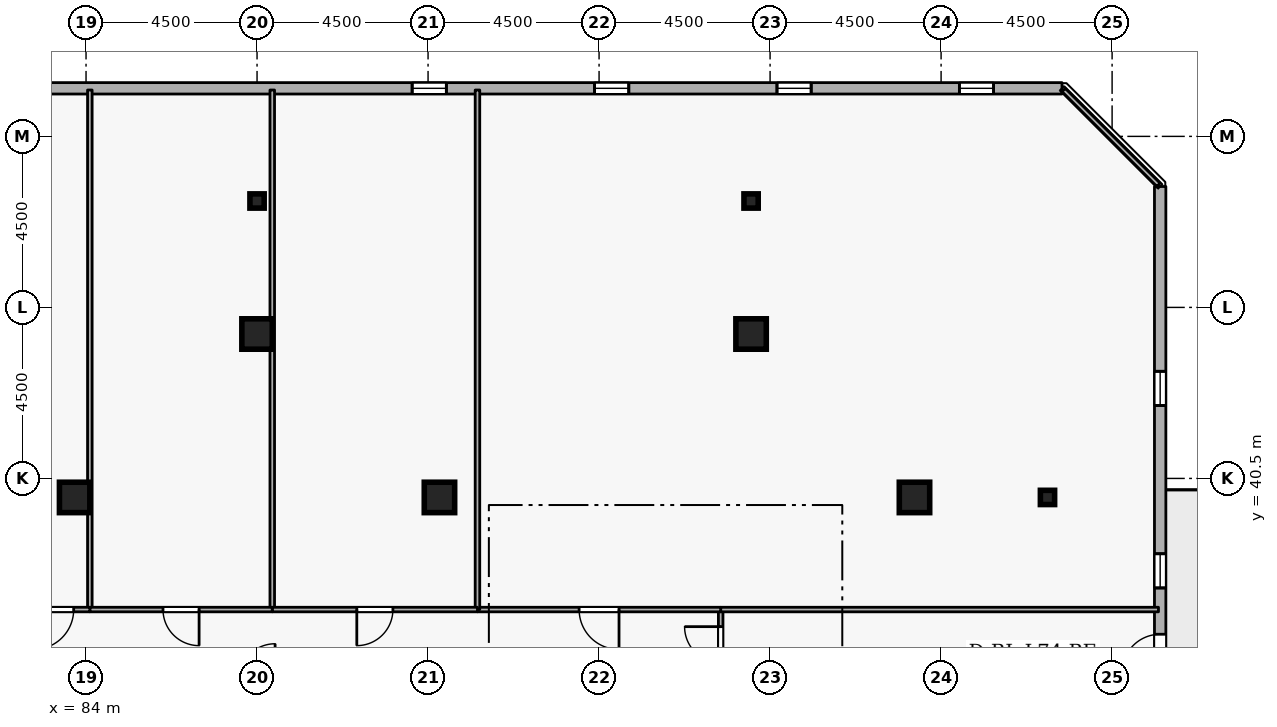
"""IFC4 building model, lengths in metres.
Left out: names, types, materials, properties, quantities, classifications, styles, units other than length and angle.
Written with IfcOpenShell. Run it as: python <this file> out.ifc"""

import sys

from ifc_helpers import new_model, si_unit, direction, frame, frame_2d, origin, origin_2d, place, context, subcontext, project, spatial, rectangle, i_section, extrude, element, fill, save


model = new_model("IFC4")
c1 = context("Model", 3, precision=1e-05, world=origin(), true_north=direction((0.0, 1.0)))
c2 = subcontext(c1, "Body", "Model", "MODEL_VIEW")
j1 = project(units=[si_unit("LENGTHUNIT", "METRE"), si_unit("PLANEANGLEUNIT", "RADIAN")], contexts=[c1])
p1 = place(None, origin())
s1 = spatial("IfcSite", under=j1, at=p1, CompositionType="ELEMENT")
p2 = place(p1, origin())
s2 = spatial("IfcBuilding", under=s1, at=p2, CompositionType="ELEMENT")
p3 = place(p2, frame((0.0, 0.0, 276.3)))
s3 = spatial("IfcBuildingStorey", under=s2, at=p3, CompositionType="ELEMENT", Elevation=276.3)
for number, where, z_axis, x_axis in (
    (1, (105.8, 40.0, 0.0), (0.0, 0.0, 1.0), (1.0, 0.0, 0.0)),
    (2, (101.5, 44.3, 0.0), (0.0, 0.0, 1.0), (1.0, 0.0, 0.0)),
    (3, (88.5, 44.3, 0.0), (0.0, 0.0, 1.0), (1.0, 0.0, 0.0)),
    (4, (93.3, 40.0, 0.0), (0.0, 0.0, 1.0), (1.0, 0.0, 0.0)),
    (5, (83.7, 40.0, 0.0), (0.0, 0.0, 1.0), (1.0, 0.0, 0.0)),
):
    element("IfcColumn", number, at=place(p3, frame(where, z_axis=z_axis, x_axis=x_axis)), inside=s3, PredefinedType="COLUMN", context=c2, shape_type="SweptSolid", body=[
        extrude(rectangle(XDim=0.8, YDim=0.8, at=origin_2d()), origin(), (0.0, 0.0, 1.0), 3.6),
    ])
for number, where, z_axis, x_axis in (
    (6, (109.3, 40.0, 0.0), (0.0, 0.0, 1.0), (1.0, 0.0, 0.0)),
    (7, (101.5, 47.8, 0.0), (0.0, 0.0, 1.0), (1.0, 0.0, 0.0)),
    (8, (88.5, 47.8, 0.0), (0.0, 0.0, 1.0), (1.0, 0.0, 0.0)),
):
    element("IfcColumn", number, at=place(p3, frame(where, z_axis=z_axis, x_axis=x_axis)), inside=s3, PredefinedType="COLUMN", context=c2, shape_type="SweptSolid", body=[
        extrude(i_section(OverallWidth=0.375, OverallDepth=0.375, WebThickness=0.017, FlangeThickness=0.027, FilletRadius=0.015, at=origin_2d()), origin(), (0.0, 0.0, 1.0), 3.6),
    ])
p4 = place(p3, frame((112.265, 11.819, 0.0), z_axis=(0.0, 0.0, 1.0), x_axis=(0.0, 1.0, 0.0)))
e9 = element("IfcWall", 9, at=p4, inside=s3, PredefinedType="STANDARD", context=c2, shape_type="SweptSolid", body=[
    extrude(rectangle(XDim=36.363, YDim=0.3, at=frame_2d((18.181, 0.0))), origin(), (0.0, 0.0, 1.0), 2.66),
])
p5 = place(p4, frame((23.581, 0.0, 0.0)))
e10 = element("IfcOpeningElement", 10, at=p5, cuts=e9, PredefinedType="OPENING", context=c2, shape_type="SweptSolid", body=[
    extrude(rectangle(XDim=1.0, YDim=2.08, at=frame_2d((0.5, 1.04))), frame((0.0, 0.16, 0.0), z_axis=(0.0, -1.0, 0.0), x_axis=(1.0, 0.0, 0.0)), (0.0, 0.0, 1.0), 0.32),
])
p6 = place(p4, frame((1.8, 0.0, 0.72)))
e11 = element("IfcOpeningElement", 11, at=p6, cuts=e9, PredefinedType="OPENING", context=c2, shape_type="SweptSolid", body=[
    extrude(rectangle(XDim=0.9, YDim=1.75, at=frame_2d((0.45, 0.875))), frame((0.0, 0.16, 0.0), z_axis=(0.0, -1.0, 0.0), x_axis=(1.0, 0.0, 0.0)), (0.0, 0.0, 1.0), 0.32),
])
p7 = place(p4, frame((6.6, 0.0, 0.72)))
e12 = element("IfcOpeningElement", 12, at=p7, cuts=e9, PredefinedType="OPENING", context=c2, shape_type="SweptSolid", body=[
    extrude(rectangle(XDim=0.9, YDim=1.75, at=frame_2d((0.45, 0.875))), frame((0.0, 0.16, 0.0), z_axis=(0.0, -1.0, 0.0), x_axis=(1.0, 0.0, 0.0)), (0.0, 0.0, 1.0), 0.32),
])
p8 = place(p4, frame((11.4, 0.0, 0.72)))
e13 = element("IfcOpeningElement", 13, at=p8, cuts=e9, PredefinedType="OPENING", context=c2, shape_type="SweptSolid", body=[
    extrude(rectangle(XDim=0.9, YDim=1.75, at=frame_2d((0.45, 0.875))), frame((0.0, 0.16, 0.0), z_axis=(0.0, -1.0, 0.0), x_axis=(1.0, 0.0, 0.0)), (0.0, 0.0, 1.0), 0.32),
])
p9 = place(p4, frame((16.2, 0.0, 0.72)))
e14 = element("IfcOpeningElement", 14, at=p9, cuts=e9, PredefinedType="OPENING", context=c2, shape_type="SweptSolid", body=[
    extrude(rectangle(XDim=0.9, YDim=1.75, at=frame_2d((0.45, 0.875))), frame((0.0, 0.16, 0.0), z_axis=(0.0, -1.0, 0.0), x_axis=(1.0, 0.0, 0.0)), (0.0, 0.0, 1.0), 0.32),
])
p10 = place(p4, frame((21.0, 0.0, 0.72)))
e15 = element("IfcOpeningElement", 15, at=p10, cuts=e9, PredefinedType="OPENING", context=c2, shape_type="SweptSolid", body=[
    extrude(rectangle(XDim=0.9, YDim=1.75, at=frame_2d((0.45, 0.875))), frame((0.0, 0.16, 0.0), z_axis=(0.0, -1.0, 0.0), x_axis=(1.0, 0.0, 0.0)), (0.0, 0.0, 1.0), 0.32),
])
p11 = place(p4, frame((25.8, 0.0, 0.72)))
e16 = element("IfcOpeningElement", 16, at=p11, cuts=e9, PredefinedType="OPENING", context=c2, shape_type="SweptSolid", body=[
    extrude(rectangle(XDim=0.9, YDim=1.75, at=frame_2d((0.45, 0.875))), frame((0.0, 0.16, 0.0), z_axis=(0.0, -1.0, 0.0), x_axis=(1.0, 0.0, 0.0)), (0.0, 0.0, 1.0), 0.32),
])
p12 = place(p4, frame((30.6, 0.0, 0.72)))
e17 = element("IfcOpeningElement", 17, at=p12, cuts=e9, PredefinedType="OPENING", context=c2, shape_type="SweptSolid", body=[
    extrude(rectangle(XDim=0.9, YDim=1.75, at=frame_2d((0.45, 0.875))), frame((0.0, 0.16, 0.0), z_axis=(0.0, -1.0, 0.0), x_axis=(1.0, 0.0, 0.0)), (0.0, 0.0, 1.0), 0.32),
])
p13 = place(p3, frame((109.681, 50.765, 0.0), z_axis=(0.0, 0.0, 1.0), x_axis=(-1.0, 0.0, 0.0)))
e18 = element("IfcWall", 18, at=p13, inside=s3, PredefinedType="STANDARD", context=c2, shape_type="SweptSolid", body=[
    extrude(rectangle(XDim=36.363, YDim=0.3, at=frame_2d((18.181, 0.0))), origin(), (0.0, 0.0, 1.0), 2.66),
])
p14 = place(p13, frame((1.8, 0.0, 0.72)))
e19 = element("IfcOpeningElement", 19, at=p14, cuts=e18, PredefinedType="OPENING", context=c2, shape_type="SweptSolid", body=[
    extrude(rectangle(XDim=0.9, YDim=1.75, at=frame_2d((0.45, 0.875))), frame((0.0, 0.16, 0.0), z_axis=(0.0, -1.0, 0.0), x_axis=(1.0, 0.0, 0.0)), (0.0, 0.0, 1.0), 0.32),
])
p15 = place(p13, frame((6.6, 0.0, 0.72)))
e20 = element("IfcOpeningElement", 20, at=p15, cuts=e18, PredefinedType="OPENING", context=c2, shape_type="SweptSolid", body=[
    extrude(rectangle(XDim=0.9, YDim=1.75, at=frame_2d((0.45, 0.875))), frame((0.0, 0.16, 0.0), z_axis=(0.0, -1.0, 0.0), x_axis=(1.0, 0.0, 0.0)), (0.0, 0.0, 1.0), 0.32),
])
p16 = place(p13, frame((11.4, 0.0, 0.72)))
e21 = element("IfcOpeningElement", 21, at=p16, cuts=e18, PredefinedType="OPENING", context=c2, shape_type="SweptSolid", body=[
    extrude(rectangle(XDim=0.9, YDim=1.75, at=frame_2d((0.45, 0.875))), frame((0.0, 0.16, 0.0), z_axis=(0.0, -1.0, 0.0), x_axis=(1.0, 0.0, 0.0)), (0.0, 0.0, 1.0), 0.32),
])
p17 = place(p13, frame((16.2, 0.0, 0.72)))
e22 = element("IfcOpeningElement", 22, at=p17, cuts=e18, PredefinedType="OPENING", context=c2, shape_type="SweptSolid", body=[
    extrude(rectangle(XDim=0.9, YDim=1.75, at=frame_2d((0.45, 0.875))), frame((0.0, 0.16, 0.0), z_axis=(0.0, -1.0, 0.0), x_axis=(1.0, 0.0, 0.0)), (0.0, 0.0, 1.0), 0.32),
])
p18 = place(p13, frame((30.6, 0.0, 0.72)))
e23 = element("IfcOpeningElement", 23, at=p18, cuts=e18, PredefinedType="OPENING", context=c2, shape_type="SweptSolid", body=[
    extrude(rectangle(XDim=0.9, YDim=1.75, at=frame_2d((0.45, 0.875))), frame((0.0, 0.16, 0.0), z_axis=(0.0, -1.0, 0.0), x_axis=(1.0, 0.0, 0.0)), (0.0, 0.0, 1.0), 0.32),
])
p19 = place(p3, frame((100.7, 35.2, 0.0), z_axis=(0.0, 0.0, 1.0), x_axis=(0.0, 1.0, 0.0)))
e24 = element("IfcWall", 24, at=p19, inside=s3, PredefinedType="PARTITIONING", context=c2, shape_type="SweptSolid", body=[
    extrude(rectangle(XDim=1.85, YDim=0.12, at=frame_2d((0.925, 0.0))), origin(), (0.0, 0.0, 1.0), 3.26),
])
p20 = place(p19, frame((0.45, 0.0, 0.0)))
e25 = element("IfcOpeningElement", 25, at=p20, cuts=e24, PredefinedType="OPENING", context=c2, shape_type="SweptSolid", body=[
    extrude(rectangle(XDim=0.95, YDim=2.1, at=frame_2d((0.475, 1.05))), frame((0.0, 0.07, 0.0), z_axis=(0.0, -1.0, 0.0), x_axis=(1.0, 0.0, 0.0)), (0.0, 0.0, 1.0), 0.14),
])
p21 = place(p3, frame((100.7, 37.05, 0.0), z_axis=(0.0, 0.0, 1.0), x_axis=(1.0, 0.0, 0.0)))
e26 = element("IfcWall", 26, at=p21, inside=s3, PredefinedType="PARTITIONING", context=c2, shape_type="SweptSolid", body=[
    extrude(rectangle(XDim=11.52, YDim=0.12, at=frame_2d((5.76, 0.0))), origin(), (0.0, 0.0, 1.0), 3.26),
])
p22 = place(p3, frame((100.7, 37.05, 0.0), z_axis=(0.0, 0.0, 1.0), x_axis=(-1.0, 0.0, 0.0)))
e27 = element("IfcWall", 27, at=p22, inside=s3, PredefinedType="PARTITIONING", context=c2, shape_type="SweptSolid", body=[
    extrude(rectangle(XDim=6.4, YDim=0.12, at=frame_2d((3.2, 0.0))), origin(), (0.0, 0.0, 1.0), 3.26),
])
p23 = place(p22, frame((2.675, 0.0, 0.0)))
e28 = element("IfcOpeningElement", 28, at=p23, cuts=e27, PredefinedType="OPENING", context=c2, shape_type="SweptSolid", body=[
    extrude(rectangle(XDim=1.05, YDim=2.1, at=frame_2d((0.525, 1.05))), frame((0.0, 0.07, 0.0), z_axis=(0.0, -1.0, 0.0), x_axis=(1.0, 0.0, 0.0)), (0.0, 0.0, 1.0), 0.14),
])
p24 = place(p3, frame((94.3, 37.05, 0.0), z_axis=(0.0, 0.0, 1.0), x_axis=(0.0, 1.0, 0.0)))
e29 = element("IfcWall", 29, at=p24, inside=s3, PredefinedType="PARTITIONING", context=c2, shape_type="SweptSolid", body=[
    extrude(rectangle(XDim=13.67, YDim=0.12, at=frame_2d((6.835, 0.0))), origin(), (0.0, 0.0, 1.0), 3.26),
])
p25 = place(p3, frame((109.725, 50.72, 0.0), z_axis=(0.0, 0.0, 1.0), x_axis=(0.707106781187, -0.707106781187, 0.0)))
e30 = element("IfcWall", 30, at=p25, inside=s3, PredefinedType="PARTITIONING", context=c2, shape_type="SweptSolid", body=[
    extrude(rectangle(XDim=3.528, YDim=0.12, at=frame_2d((1.764, 0.0))), origin(), (0.0, 0.0, 1.0), 3.26),
])
p26 = place(p3, frame((88.9, 37.05, 0.0), z_axis=(0.0, 0.0, 1.0), x_axis=(0.0, 1.0, 0.0)))
e31 = element("IfcWall", 31, at=p26, inside=s3, PredefinedType="PARTITIONING", context=c2, shape_type="SweptSolid", body=[
    extrude(rectangle(XDim=13.67, YDim=0.12, at=frame_2d((6.835, 0.0))), origin(), (0.0, 0.0, 1.0), 3.26),
])
p27 = place(p3, frame((94.3, 37.05, 0.0), z_axis=(0.0, 0.0, 1.0), x_axis=(-1.0, 0.0, 0.0)))
e32 = element("IfcWall", 32, at=p27, inside=s3, PredefinedType="PARTITIONING", context=c2, shape_type="SweptSolid", body=[
    extrude(rectangle(XDim=5.4, YDim=0.12, at=frame_2d((2.7, 0.0))), origin(), (0.0, 0.0, 1.0), 3.26),
])
p28 = place(p27, frame((2.225, 0.0, 0.0)))
e33 = element("IfcOpeningElement", 33, at=p28, cuts=e32, PredefinedType="OPENING", context=c2, shape_type="SweptSolid", body=[
    extrude(rectangle(XDim=0.95, YDim=2.1, at=frame_2d((0.475, 1.05))), frame((0.0, 0.07, 0.0), z_axis=(0.0, -1.0, 0.0), x_axis=(1.0, 0.0, 0.0)), (0.0, 0.0, 1.0), 0.14),
])
p29 = place(p3, frame((84.1, 37.05, 0.0), z_axis=(0.0, 0.0, 1.0), x_axis=(0.0, 1.0, 0.0)))
e34 = element("IfcWall", 34, at=p29, inside=s3, PredefinedType="PARTITIONING", context=c2, shape_type="SweptSolid", body=[
    extrude(rectangle(XDim=13.67, YDim=0.12, at=frame_2d((6.835, 0.0))), origin(), (0.0, 0.0, 1.0), 3.26),
])
p30 = place(p3, frame((88.9, 37.05, 0.0), z_axis=(0.0, 0.0, 1.0), x_axis=(-1.0, 0.0, 0.0)))
e35 = element("IfcWall", 35, at=p30, inside=s3, PredefinedType="PARTITIONING", context=c2, shape_type="SweptSolid", body=[
    extrude(rectangle(XDim=4.8, YDim=0.12, at=frame_2d((2.4, 0.0))), origin(), (0.0, 0.0, 1.0), 3.26),
])
p31 = place(p30, frame((1.925, 0.0, 0.0)))
e36 = element("IfcOpeningElement", 36, at=p31, cuts=e35, PredefinedType="OPENING", context=c2, shape_type="SweptSolid", body=[
    extrude(rectangle(XDim=0.95, YDim=2.1, at=frame_2d((0.475, 1.05))), frame((0.0, 0.07, 0.0), z_axis=(0.0, -1.0, 0.0), x_axis=(1.0, 0.0, 0.0)), (0.0, 0.0, 1.0), 0.14),
])
p32 = place(p3, frame((84.1, 37.05, 0.0), z_axis=(0.0, 0.0, 1.0), x_axis=(-1.0, 0.0, 0.0)))
e37 = element("IfcWall", 37, at=p32, inside=s3, PredefinedType="PARTITIONING", context=c2, shape_type="SweptSolid", body=[
    extrude(rectangle(XDim=1.9, YDim=0.12, at=frame_2d((0.95, 0.0))), origin(), (0.0, 0.0, 1.0), 3.26),
])
p33 = place(p32, frame((0.425, 0.0, 0.0)))
e38 = element("IfcOpeningElement", 38, at=p33, cuts=e37, PredefinedType="OPENING", context=c2, shape_type="SweptSolid", body=[
    extrude(rectangle(XDim=1.05, YDim=2.1, at=frame_2d((0.525, 1.05))), frame((0.0, 0.07, 0.0), z_axis=(0.0, -1.0, 0.0), x_axis=(1.0, 0.0, 0.0)), (0.0, 0.0, 1.0), 0.14),
])
p34 = place(p5, origin())
e39 = element("IfcDoor", 39, at=p34, inside=s3, OperationType="SINGLE_SWING_LEFT", PredefinedType="DOOR", context=c2, shape_type="SweptSolid", body=[
    extrude(rectangle(XDim=1.0, YDim=2.08, at=frame_2d((0.5, 1.04))), frame((0.0, 0.025, 0.0), z_axis=(0.0, -1.0, 0.0), x_axis=(1.0, 0.0, 0.0)), (0.0, 0.0, 1.0), 0.05),
])
fill(e10, e39)
p35 = place(p11, origin())
e40 = element("IfcWindow", 40, at=p35, inside=s3, PartitioningType="SINGLE_PANEL", PredefinedType="WINDOW", context=c2, shape_type="SweptSolid", body=[
    extrude(rectangle(XDim=0.9, YDim=1.75, at=frame_2d((0.45, 0.875))), frame((0.0, 0.03, 0.0), z_axis=(0.0, -1.0, 0.0), x_axis=(1.0, 0.0, 0.0)), (0.0, 0.0, 1.0), 0.06),
])
fill(e16, e40)
p36 = place(p12, origin())
e41 = element("IfcWindow", 41, at=p36, inside=s3, PartitioningType="SINGLE_PANEL", PredefinedType="WINDOW", context=c2, shape_type="SweptSolid", body=[
    extrude(rectangle(XDim=0.9, YDim=1.75, at=frame_2d((0.45, 0.875))), frame((0.0, 0.03, 0.0), z_axis=(0.0, -1.0, 0.0), x_axis=(1.0, 0.0, 0.0)), (0.0, 0.0, 1.0), 0.06),
])
fill(e17, e41)
p37 = place(p14, origin())
e42 = element("IfcWindow", 42, at=p37, inside=s3, PartitioningType="SINGLE_PANEL", PredefinedType="WINDOW", context=c2, shape_type="SweptSolid", body=[
    extrude(rectangle(XDim=0.9, YDim=1.75, at=frame_2d((0.45, 0.875))), frame((0.0, 0.03, 0.0), z_axis=(0.0, -1.0, 0.0), x_axis=(1.0, 0.0, 0.0)), (0.0, 0.0, 1.0), 0.06),
])
fill(e19, e42)
p38 = place(p15, origin())
e43 = element("IfcWindow", 43, at=p38, inside=s3, PartitioningType="SINGLE_PANEL", PredefinedType="WINDOW", context=c2, shape_type="SweptSolid", body=[
    extrude(rectangle(XDim=0.9, YDim=1.75, at=frame_2d((0.45, 0.875))), frame((0.0, 0.03, 0.0), z_axis=(0.0, -1.0, 0.0), x_axis=(1.0, 0.0, 0.0)), (0.0, 0.0, 1.0), 0.06),
])
fill(e20, e43)
p39 = place(p16, origin())
e44 = element("IfcWindow", 44, at=p39, inside=s3, PartitioningType="SINGLE_PANEL", PredefinedType="WINDOW", context=c2, shape_type="SweptSolid", body=[
    extrude(rectangle(XDim=0.9, YDim=1.75, at=frame_2d((0.45, 0.875))), frame((0.0, 0.03, 0.0), z_axis=(0.0, -1.0, 0.0), x_axis=(1.0, 0.0, 0.0)), (0.0, 0.0, 1.0), 0.06),
])
fill(e21, e44)
p40 = place(p17, origin())
e45 = element("IfcWindow", 45, at=p40, inside=s3, PartitioningType="SINGLE_PANEL", PredefinedType="WINDOW", context=c2, shape_type="SweptSolid", body=[
    extrude(rectangle(XDim=0.9, YDim=1.75, at=frame_2d((0.45, 0.875))), frame((0.0, 0.03, 0.0), z_axis=(0.0, -1.0, 0.0), x_axis=(1.0, 0.0, 0.0)), (0.0, 0.0, 1.0), 0.06),
])
fill(e22, e45)
p41 = place(p20, origin())
e46 = element("IfcDoor", 46, at=p41, inside=s3, OperationType="SINGLE_SWING_RIGHT", PredefinedType="DOOR", context=c2, shape_type="SweptSolid", body=[
    extrude(rectangle(XDim=0.95, YDim=2.1, at=frame_2d((0.475, 1.05))), frame((0.0, 0.025, 0.0), z_axis=(0.0, -1.0, 0.0), x_axis=(1.0, 0.0, 0.0)), (0.0, 0.0, 1.0), 0.05),
])
fill(e25, e46)
p42 = place(p23, origin())
e47 = element("IfcDoor", 47, at=p42, inside=s3, OperationType="SINGLE_SWING_LEFT", PredefinedType="DOOR", context=c2, shape_type="SweptSolid", body=[
    extrude(rectangle(XDim=1.05, YDim=2.1, at=frame_2d((0.525, 1.05))), frame((0.0, 0.025, 0.0), z_axis=(0.0, -1.0, 0.0), x_axis=(1.0, 0.0, 0.0)), (0.0, 0.0, 1.0), 0.05),
])
fill(e28, e47)
p43 = place(p28, origin())
e48 = element("IfcDoor", 48, at=p43, inside=s3, OperationType="SINGLE_SWING_RIGHT", PredefinedType="DOOR", context=c2, shape_type="SweptSolid", body=[
    extrude(rectangle(XDim=0.95, YDim=2.1, at=frame_2d((0.475, 1.05))), frame((0.0, 0.025, 0.0), z_axis=(0.0, -1.0, 0.0), x_axis=(1.0, 0.0, 0.0)), (0.0, 0.0, 1.0), 0.05),
])
fill(e33, e48)
p44 = place(p31, origin())
e49 = element("IfcDoor", 49, at=p44, inside=s3, OperationType="SINGLE_SWING_LEFT", PredefinedType="DOOR", context=c2, shape_type="SweptSolid", body=[
    extrude(rectangle(XDim=0.95, YDim=2.1, at=frame_2d((0.475, 1.05))), frame((0.0, 0.025, 0.0), z_axis=(0.0, -1.0, 0.0), x_axis=(1.0, 0.0, 0.0)), (0.0, 0.0, 1.0), 0.05),
])
fill(e36, e49)
p45 = place(p33, origin())
e50 = element("IfcDoor", 50, at=p45, inside=s3, OperationType="SINGLE_SWING_RIGHT", PredefinedType="DOOR", context=c2, shape_type="SweptSolid", body=[
    extrude(rectangle(XDim=1.05, YDim=2.1, at=frame_2d((0.525, 1.05))), frame((0.0, 0.025, 0.0), z_axis=(0.0, -1.0, 0.0), x_axis=(1.0, 0.0, 0.0)), (0.0, 0.0, 1.0), 0.05),
])
fill(e38, e50)
save(model, sys.argv[1])
